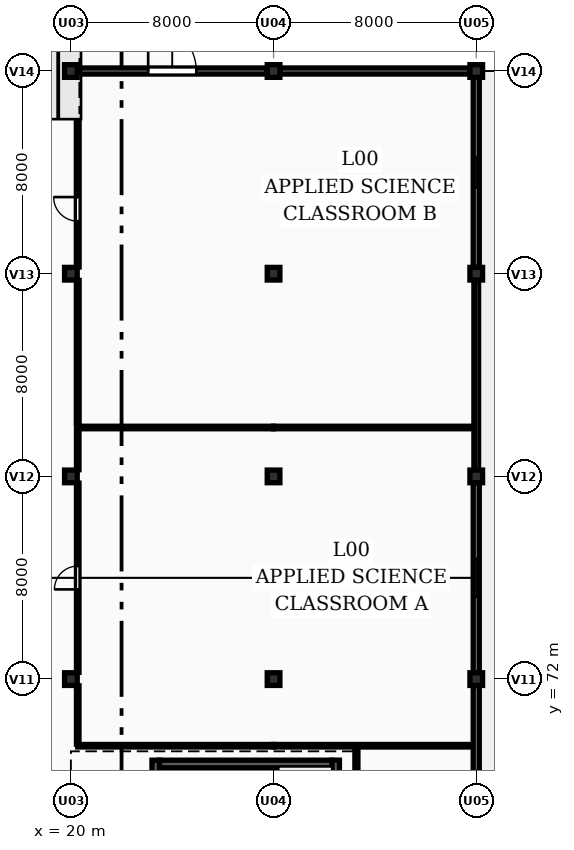
"""IFC4 building model, lengths in metres.
Left out: names, types, materials, properties, quantities, classifications, styles, units other than length and angle.
Written with IfcOpenShell. Run it as: python <this file> out.ifc"""

import sys

from ifc_helpers import new_model, si_unit, direction, frame, frame_2d, origin, origin_2d, place, context, subcontext, project, spatial, rectangle, extrude, element, fill, save


model = new_model("IFC4")
c1 = context("Model", 3, precision=1e-05, world=origin(), true_north=direction((0.0, 1.0)))
c2 = subcontext(c1, "Body", "Model", "MODEL_VIEW")
j1 = project(units=[si_unit("LENGTHUNIT", "METRE"), si_unit("PLANEANGLEUNIT", "RADIAN")], contexts=[c1])
p1 = place(None, origin())
s1 = spatial("IfcSite", under=j1, at=p1, CompositionType="ELEMENT")
p2 = place(p1, origin())
s2 = spatial("IfcBuilding", under=s1, at=p2, CompositionType="ELEMENT")
p3 = place(p2, origin())
s3 = spatial("IfcBuildingStorey", under=s2, at=p3, CompositionType="ELEMENT", Elevation=0.0)
for number, where, z_axis, x_axis in (
    (1, (20.0, 72.0, -0.2), (0.0, 0.0, 1.0), (1.0, 0.0, 0.0)),
    (2, (20.0, 80.0, -0.2), (0.0, 0.0, 1.0), (1.0, 0.0, 0.0)),
    (3, (20.0, 88.0, -0.2), (0.0, 0.0, 1.0), (1.0, 0.0, 0.0)),
    (4, (20.0, 96.0, -0.2), (0.0, 0.0, 1.0), (1.0, 0.0, 0.0)),
    (5, (28.0, 72.0, -0.2), (0.0, 0.0, 1.0), (1.0, 0.0, 0.0)),
    (6, (28.0, 80.0, -0.2), (0.0, 0.0, 1.0), (1.0, 0.0, 0.0)),
    (7, (28.0, 88.0, -0.2), (0.0, 0.0, 1.0), (1.0, 0.0, 0.0)),
    (8, (28.0, 96.0, -0.2), (0.0, 0.0, 1.0), (1.0, 0.0, 0.0)),
    (9, (36.0, 72.0, -0.2), (0.0, 0.0, 1.0), (1.0, 0.0, 0.0)),
    (10, (36.0, 80.0, -0.2), (0.0, 0.0, 1.0), (1.0, 0.0, 0.0)),
    (11, (36.0, 88.0, -0.2), (0.0, 0.0, 1.0), (1.0, 0.0, 0.0)),
    (12, (36.0, 96.0, -0.2), (0.0, 0.0, 1.0), (1.0, 0.0, 0.0)),
):
    element("IfcColumn", number, at=place(p3, frame(where, z_axis=z_axis, x_axis=x_axis)), inside=s3, PredefinedType="COLUMN", context=c2, shape_type="SweptSolid", body=[
        extrude(rectangle(XDim=0.5, YDim=0.5, at=origin_2d()), origin(), (0.0, 0.0, 1.0), 4.7),
    ])
p4 = place(p3, frame((12.25, 96.0, 0.0), z_axis=(0.0, 0.0, 1.0), x_axis=(1.0, 0.0, 0.0)))
e13 = element("IfcWall", 13, at=p4, inside=s3, PredefinedType="SOLIDWALL", context=c2, shape_type="SweptSolid", body=[
    extrude(rectangle(XDim=7.5, YDim=0.24, at=frame_2d((3.75, 0.0))), origin(), (0.0, 0.0, 1.0), 3.59),
])
p5 = place(p4, frame((1.65, 0.0, 0.95)))
e14 = element("IfcOpeningElement", 14, at=p5, cuts=e13, PredefinedType="OPENING", context=c2, shape_type="SweptSolid", body=[
    extrude(rectangle(XDim=2.4, YDim=1.35, at=frame_2d((1.2, 0.675))), frame((0.0, 0.13, 0.0), z_axis=(0.0, -1.0, 0.0), x_axis=(1.0, 0.0, 0.0)), (0.0, 0.0, 1.0), 0.26),
])
p6 = place(p3, frame((20.25, 96.0, 0.0), z_axis=(0.0, 0.0, 1.0), x_axis=(1.0, 0.0, 0.0)))
e15 = element("IfcWall", 15, at=p6, inside=s3, PredefinedType="SOLIDWALL", context=c2, shape_type="SweptSolid", body=[
    extrude(rectangle(XDim=7.5, YDim=0.24, at=frame_2d((3.75, 0.0))), origin(), (0.0, 0.0, 1.0), 3.59),
])
p7 = place(p6, frame((2.8, 0.0, 0.0)))
e16 = element("IfcOpeningElement", 16, at=p7, cuts=e15, PredefinedType="OPENING", context=c2, shape_type="SweptSolid", body=[
    extrude(rectangle(XDim=1.9, YDim=2.25, at=frame_2d((0.95, 1.125))), frame((0.0, 0.13, 0.0), z_axis=(0.0, -1.0, 0.0), x_axis=(1.0, 0.0, 0.0)), (0.0, 0.0, 1.0), 0.26),
])
p8 = place(p3, frame((28.25, 96.0, 0.0), z_axis=(0.0, 0.0, 1.0), x_axis=(1.0, 0.0, 0.0)))
e17 = element("IfcWall", 17, at=p8, inside=s3, PredefinedType="SOLIDWALL", context=c2, shape_type="SweptSolid", body=[
    extrude(rectangle(XDim=7.5, YDim=0.24, at=frame_2d((3.75, 0.0))), origin(), (0.0, 0.0, 1.0), 3.59),
])
p9 = place(p3, frame((36.0, 95.75, 0.0), z_axis=(0.0, 0.0, 1.0), x_axis=(0.0, -1.0, 0.0)))
e18 = element("IfcWall", 18, at=p9, inside=s3, PredefinedType="SOLIDWALL", context=c2, shape_type="SweptSolid", body=[
    extrude(rectangle(XDim=7.5, YDim=0.24, at=frame_2d((3.75, 0.0))), origin(), (0.0, 0.0, 1.0), 3.59),
])
p10 = place(p9, frame((3.15, 0.0, 0.95)))
e19 = element("IfcOpeningElement", 19, at=p10, cuts=e18, PredefinedType="OPENING", context=c2, shape_type="SweptSolid", body=[
    extrude(rectangle(XDim=1.2, YDim=1.2, at=frame_2d((0.6, 0.6))), frame((0.0, 0.13, 0.0), z_axis=(0.0, -1.0, 0.0), x_axis=(1.0, 0.0, 0.0)), (0.0, 0.0, 1.0), 0.26),
])
p11 = place(p3, frame((36.0, 87.75, 0.0), z_axis=(0.0, 0.0, 1.0), x_axis=(0.0, -1.0, 0.0)))
e20 = element("IfcWall", 20, at=p11, inside=s3, PredefinedType="SOLIDWALL", context=c2, shape_type="SweptSolid", body=[
    extrude(rectangle(XDim=7.5, YDim=0.185, at=frame_2d((3.75, 0.0))), origin(), (0.0, 0.0, 1.0), 0.95),
])
p12 = place(p3, frame((36.0, 79.75, 0.0), z_axis=(0.0, 0.0, 1.0), x_axis=(0.0, -1.0, 0.0)))
e21 = element("IfcWall", 21, at=p12, inside=s3, PredefinedType="SOLIDWALL", context=c2, shape_type="SweptSolid", body=[
    extrude(rectangle(XDim=7.5, YDim=0.24, at=frame_2d((3.75, 0.0))), origin(), (0.0, 0.0, 1.0), 3.59),
])
p13 = place(p12, frame((3.0, 0.0, 0.95)))
e22 = element("IfcOpeningElement", 22, at=p13, cuts=e21, PredefinedType="OPENING", context=c2, shape_type="SweptSolid", body=[
    extrude(rectangle(XDim=1.5, YDim=1.2, at=frame_2d((0.75, 0.6))), frame((0.0, 0.13, 0.0), z_axis=(0.0, -1.0, 0.0), x_axis=(1.0, 0.0, 0.0)), (0.0, 0.0, 1.0), 0.26),
])
p14 = place(p3, frame((36.0, 71.75, 0.0), z_axis=(0.0, 0.0, 1.0), x_axis=(0.0, -1.0, 0.0)))
e23 = element("IfcWall", 23, at=p14, inside=s3, PredefinedType="SOLIDWALL", context=c2, shape_type="SweptSolid", body=[
    extrude(rectangle(XDim=7.5, YDim=0.24, at=frame_2d((3.75, 0.0))), origin(), (0.0, 0.0, 1.0), 3.59),
])
p15 = place(p14, frame((3.95, 0.0, 0.0)))
e24 = element("IfcOpeningElement", 24, at=p15, cuts=e23, PredefinedType="OPENING", context=c2, shape_type="SweptSolid", body=[
    extrude(rectangle(XDim=1.8, YDim=2.2, at=frame_2d((0.9, 1.1))), frame((0.0, 0.13, 0.0), z_axis=(0.0, -1.0, 0.0), x_axis=(1.0, 0.0, 0.0)), (0.0, 0.0, 1.0), 0.26),
])
for number, where, z_axis, x_axis in (
    (25, (23.35, 64.7, 0.0), (0.0, 0.0, 1.0), (0.0, 1.0, 0.0)),
    (26, (30.45, 68.8, 0.0), (0.0, 0.0, 1.0), (0.0, -1.0, 0.0)),
):
    element("IfcWall", number, at=place(p3, frame(where, z_axis=z_axis, x_axis=x_axis)), inside=s3, PredefinedType="SHEAR", context=c2, shape_type="SweptSolid", body=[
        extrude(rectangle(XDim=4.1, YDim=0.3, at=frame_2d((2.05, 0.0))), origin(), (0.0, 0.0, 1.0), 4.24),
    ])
p16 = place(p3, frame((30.3, 68.65, 0.0), z_axis=(0.0, 0.0, 1.0), x_axis=(-1.0, 0.0, 0.0)))
e27 = element("IfcWall", 27, at=p16, inside=s3, PredefinedType="SHEAR", context=c2, shape_type="SweptSolid", body=[
    extrude(rectangle(XDim=6.8, YDim=0.3, at=frame_2d((3.4, 0.0))), origin(), (0.0, 0.0, 1.0), 4.24),
])
p17 = place(p3, frame((20.27, 69.37, 0.0), z_axis=(0.0, 0.0, 1.0), x_axis=(1.0, 0.0, 0.0)))
e28 = element("IfcWall", 28, at=p17, inside=s3, PredefinedType="PARTITIONING", context=c2, shape_type="SweptSolid", body=[
    extrude(rectangle(XDim=7.73, YDim=0.1, at=frame_2d((3.865, 0.0))), origin(), (0.0, 0.0, 1.0), 4.24),
])
p18 = place(p3, frame((28.0, 69.37, 0.0), z_axis=(0.0, 0.0, 1.0), x_axis=(1.0, 0.0, 0.0)))
e29 = element("IfcWall", 29, at=p18, inside=s3, PredefinedType="PARTITIONING", context=c2, shape_type="SweptSolid", body=[
    extrude(rectangle(XDim=7.838, YDim=0.1, at=frame_2d((3.919, 0.0))), origin(), (0.0, 0.0, 1.0), 4.24),
])
p19 = place(p3, frame((20.27, 81.93, 0.0), z_axis=(0.0, 0.0, 1.0), x_axis=(1.0, 0.0, 0.0)))
e30 = element("IfcWall", 30, at=p19, inside=s3, PredefinedType="PARTITIONING", context=c2, shape_type="SweptSolid", body=[
    extrude(rectangle(XDim=7.73, YDim=0.1, at=frame_2d((3.865, 0.0))), origin(), (0.0, 0.0, 1.0), 4.24),
])
p20 = place(p3, frame((28.0, 81.93, 0.0), z_axis=(0.0, 0.0, 1.0), x_axis=(1.0, 0.0, 0.0)))
e31 = element("IfcWall", 31, at=p20, inside=s3, PredefinedType="PARTITIONING", context=c2, shape_type="SweptSolid", body=[
    extrude(rectangle(XDim=7.865, YDim=0.1, at=frame_2d((3.933, 0.0))), origin(), (0.0, 0.0, 1.0), 4.24),
])
p21 = place(p3, frame((20.27, 69.435, 0.0), z_axis=(0.0, 0.0, 1.0), x_axis=(0.0, 1.0, 0.0)))
e32 = element("IfcWall", 32, at=p21, inside=s3, PredefinedType="PARTITIONING", context=c2, shape_type="SweptSolid", body=[
    extrude(rectangle(XDim=2.3, YDim=0.1, at=frame_2d((1.15, 0.0))), origin(), (0.0, 0.0, 1.0), 3.59),
])
p22 = place(p3, frame((20.27, 72.265, 0.0), z_axis=(0.0, 0.0, 1.0), x_axis=(0.0, 1.0, 0.0)))
e33 = element("IfcWall", 33, at=p22, inside=s3, PredefinedType="PARTITIONING", context=c2, shape_type="SweptSolid", body=[
    extrude(rectangle(XDim=7.47, YDim=0.1, at=frame_2d((3.735, 0.0))), origin(), (0.0, 0.0, 1.0), 3.59),
])
p23 = place(p22, frame((3.275, 0.0, 0.0)))
e34 = element("IfcOpeningElement", 34, at=p23, cuts=e33, PredefinedType="OPENING", context=c2, shape_type="SweptSolid", body=[
    extrude(rectangle(XDim=0.92, YDim=2.1, at=frame_2d((0.46, 1.05))), frame((0.0, 0.06, 0.0), z_axis=(0.0, -1.0, 0.0), x_axis=(1.0, 0.0, 0.0)), (0.0, 0.0, 1.0), 0.12),
])
p24 = place(p3, frame((20.27, 80.265, 0.0), z_axis=(0.0, 0.0, 1.0), x_axis=(0.0, 1.0, 0.0)))
e35 = element("IfcWall", 35, at=p24, inside=s3, PredefinedType="PARTITIONING", context=c2, shape_type="SweptSolid", body=[
    extrude(rectangle(XDim=1.6, YDim=0.1, at=frame_2d((0.8, 0.0))), origin(), (0.0, 0.0, 1.0), 3.59),
])
p25 = place(p3, frame((20.27, 82.07, 0.0), z_axis=(0.0, 0.0, 1.0), x_axis=(0.0, 1.0, 0.0)))
e36 = element("IfcWall", 36, at=p25, inside=s3, PredefinedType="PARTITIONING", context=c2, shape_type="SweptSolid", body=[
    extrude(rectangle(XDim=5.665, YDim=0.11, at=frame_2d((2.833, 0.0))), origin(), (0.0, 0.0, 1.0), 3.59),
])
p26 = place(p3, frame((20.27, 88.265, 0.0), z_axis=(0.0, 0.0, 1.0), x_axis=(0.0, 1.0, 0.0)))
e37 = element("IfcWall", 37, at=p26, inside=s3, PredefinedType="PARTITIONING", context=c2, shape_type="SweptSolid", body=[
    extrude(rectangle(XDim=7.47, YDim=0.11, at=frame_2d((3.735, 0.0))), origin(), (0.0, 0.0, 1.0), 3.59),
])
p27 = place(p26, frame((1.81, 0.0, 0.0)))
e38 = element("IfcOpeningElement", 38, at=p27, cuts=e37, PredefinedType="OPENING", context=c2, shape_type="SweptSolid", body=[
    extrude(rectangle(XDim=0.95, YDim=2.1, at=frame_2d((0.475, 1.05))), frame((0.0, 0.065, 0.0), z_axis=(0.0, -1.0, 0.0), x_axis=(1.0, 0.0, 0.0)), (0.0, 0.0, 1.0), 0.13),
])
p28 = place(p3, frame((31.27, 64.745, 0.0), z_axis=(0.0, 0.0, 1.0), x_axis=(0.0, 1.0, 0.0)))
e39 = element("IfcWall", 39, at=p28, inside=s3, PredefinedType="PARTITIONING", context=c2, shape_type="SweptSolid", body=[
    extrude(rectangle(XDim=4.485, YDim=0.12, at=frame_2d((2.242, 0.0))), origin(), (0.0, 0.0, 1.0), 4.24),
])
p29 = place(p7, origin())
e40 = element("IfcDoor", 40, at=p29, inside=s3, OperationType="SINGLE_SWING_LEFT", PredefinedType="DOOR", context=c2, shape_type="SweptSolid", body=[
    extrude(rectangle(XDim=1.9, YDim=2.25, at=frame_2d((0.95, 1.125))), frame((0.0, 0.025, 0.0), z_axis=(0.0, -1.0, 0.0), x_axis=(1.0, 0.0, 0.0)), (0.0, 0.0, 1.0), 0.05),
])
fill(e16, e40)
p30 = place(p10, origin())
e41 = element("IfcWindow", 41, at=p30, inside=s3, PartitioningType="SINGLE_PANEL", PredefinedType="WINDOW", context=c2, shape_type="SweptSolid", body=[
    extrude(rectangle(XDim=1.2, YDim=1.2, at=frame_2d((0.6, 0.6))), frame((0.0, 0.03, 0.0), z_axis=(0.0, -1.0, 0.0), x_axis=(1.0, 0.0, 0.0)), (0.0, 0.0, 1.0), 0.06),
])
fill(e19, e41)
p31 = place(p13, origin())
e42 = element("IfcWindow", 42, at=p31, inside=s3, PartitioningType="SINGLE_PANEL", PredefinedType="WINDOW", context=c2, shape_type="SweptSolid", body=[
    extrude(rectangle(XDim=1.5, YDim=1.2, at=frame_2d((0.75, 0.6))), frame((0.0, 0.03, 0.0), z_axis=(0.0, -1.0, 0.0), x_axis=(1.0, 0.0, 0.0)), (0.0, 0.0, 1.0), 0.06),
])
fill(e22, e42)
p32 = place(p23, origin())
e43 = element("IfcDoor", 43, at=p32, inside=s3, OperationType="SINGLE_SWING_LEFT", PredefinedType="DOOR", context=c2, shape_type="SweptSolid", body=[
    extrude(rectangle(XDim=0.92, YDim=2.1, at=frame_2d((0.46, 1.05))), frame((0.0, 0.025, 0.0), z_axis=(0.0, -1.0, 0.0), x_axis=(1.0, 0.0, 0.0)), (0.0, 0.0, 1.0), 0.05),
])
fill(e34, e43)
p33 = place(p27, origin())
e44 = element("IfcDoor", 44, at=p33, inside=s3, OperationType="SINGLE_SWING_RIGHT", PredefinedType="DOOR", context=c2, shape_type="SweptSolid", body=[
    extrude(rectangle(XDim=0.95, YDim=2.1, at=frame_2d((0.475, 1.05))), frame((0.0, 0.025, 0.0), z_axis=(0.0, -1.0, 0.0), x_axis=(1.0, 0.0, 0.0)), (0.0, 0.0, 1.0), 0.05),
])
fill(e38, e44)
save(model, sys.argv[1])
